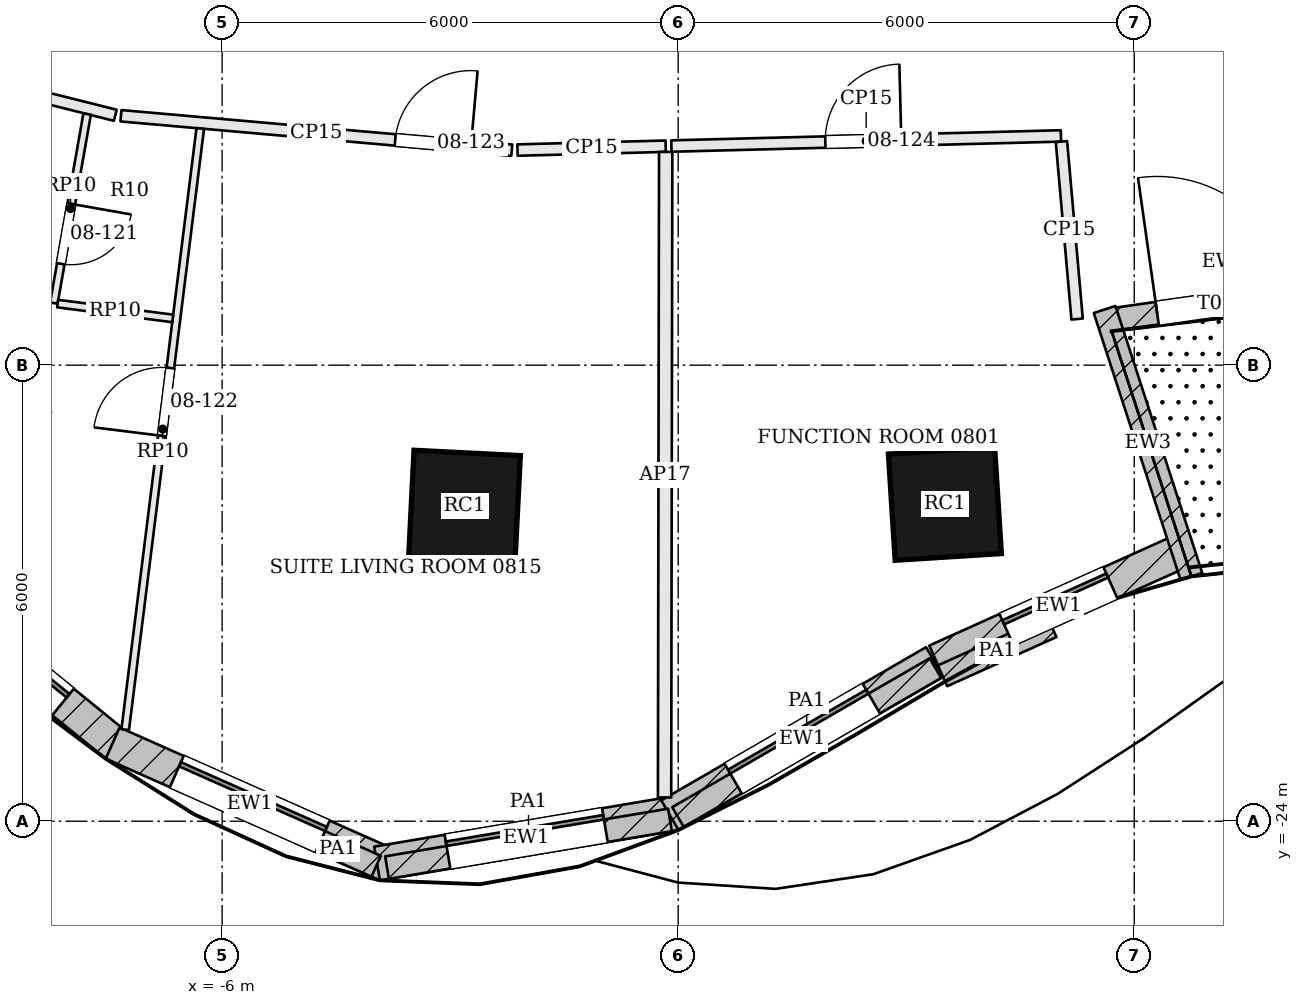
"""IFC4 building model, lengths in metres.
Left out: names, types, materials, properties, quantities, classifications, styles, units other than length and angle.
Written with IfcOpenShell. Run it as: python <this file> out.ifc"""

import sys

from ifc_helpers import new_model, si_unit, direction, frame, frame_2d, origin, origin_2d, place, context, subcontext, project, spatial, rectangle, extrude, element, fill, save


model = new_model("IFC4")
c1 = context("Model", 3, precision=1e-05, world=origin(), true_north=direction((0.0, 1.0)))
c2 = subcontext(c1, "Body", "Model", "MODEL_VIEW")
j1 = project(units=[si_unit("LENGTHUNIT", "METRE"), si_unit("PLANEANGLEUNIT", "RADIAN")], contexts=[c1])
p1 = place(None, origin())
s1 = spatial("IfcSite", under=j1, at=p1, CompositionType="ELEMENT")
p2 = place(p1, origin())
s2 = spatial("IfcBuilding", under=s1, at=p2, CompositionType="ELEMENT")
p3 = place(p2, frame((0.0, 0.0, 44.7)))
s3 = spatial("IfcBuildingStorey", under=s2, at=p3, CompositionType="ELEMENT", Elevation=44.7)
for number, where, z_axis, x_axis in (
    (1, (-2.811, -19.854, 0.0), (0.0, 0.0, 1.0), (0.999, -0.05, 0.0)),
    (2, (3.509, -19.824, 0.0), (0.0, 0.0, 1.0), (0.998, 0.063, 0.0)),
):
    element("IfcColumn", number, at=place(p3, frame(where, z_axis=z_axis, x_axis=x_axis)), inside=s3, PredefinedType="COLUMN", context=c2, shape_type="SweptSolid", body=[
        extrude(rectangle(XDim=1.4, YDim=1.4, at=origin_2d()), origin(), (0.0, 0.0, 1.0), 3.6),
    ])
p4 = place(p3, frame((-10.422, -20.539, 0.0), z_axis=(0.0, 0.0, 1.0), x_axis=(0.775999170522, -0.63073392754, 0.0)))
e3 = element("IfcWall", 3, at=p4, inside=s3, PredefinedType="SOLIDWALL", context=c2, shape_type="SweptSolid", body=[
    extrude(rectangle(XDim=3.903, YDim=0.45, at=frame_2d((1.951, 0.0))), origin(), (0.0, 0.0, 1.0), 3.4),
])
p5 = place(p4, frame((0.901, 0.0, 0.9)))
e4 = element("IfcOpeningElement", 4, at=p5, cuts=e3, PredefinedType="OPENING", context=c2, shape_type="SweptSolid", body=[
    extrude(rectangle(XDim=2.1, YDim=2.0, at=frame_2d((1.05, 1.0))), frame((0.0, 0.235, 0.0), z_axis=(0.0, -1.0, 0.0), x_axis=(1.0, 0.0, 0.0)), (0.0, 0.0, 1.0), 0.47),
])
p6 = place(p3, frame((-7.44, -22.972, 0.0), z_axis=(0.0, 0.0, 1.0), x_axis=(0.914114918534, -0.405455195692, 0.0)))
e5 = element("IfcWall", 5, at=p6, inside=s3, PredefinedType="SOLIDWALL", context=c2, shape_type="SweptSolid", body=[
    extrude(rectangle(XDim=3.946, YDim=0.45, at=frame_2d((1.973, 0.0))), origin(), (0.0, 0.0, 1.0), 3.4),
])
p7 = place(p6, frame((0.923, 0.0, 0.9)))
e6 = element("IfcOpeningElement", 6, at=p7, cuts=e5, PredefinedType="OPENING", context=c2, shape_type="SweptSolid", body=[
    extrude(rectangle(XDim=2.1, YDim=2.0, at=frame_2d((1.05, 1.0))), frame((0.0, 0.235, 0.0), z_axis=(0.0, -1.0, 0.0), x_axis=(1.0, 0.0, 0.0)), (0.0, 0.0, 1.0), 0.47),
])
p8 = place(p3, frame((-3.961, -24.556, 0.0), z_axis=(0.0, 0.0, 1.0), x_axis=(0.986102211406, 0.166139786505, 0.0)))
e7 = element("IfcWall", 7, at=p8, inside=s3, PredefinedType="SOLIDWALL", context=c2, shape_type="SweptSolid", body=[
    extrude(rectangle(XDim=3.979, YDim=0.45, at=frame_2d((1.99, 0.0))), origin(), (0.0, 0.0, 1.0), 3.4),
])
p9 = place(p8, frame((0.94, 0.0, 0.9)))
e8 = element("IfcOpeningElement", 8, at=p9, cuts=e7, PredefinedType="OPENING", context=c2, shape_type="SweptSolid", body=[
    extrude(rectangle(XDim=2.1, YDim=2.0, at=frame_2d((1.05, 1.0))), frame((0.0, 0.235, 0.0), z_axis=(0.0, -1.0, 0.0), x_axis=(1.0, 0.0, 0.0)), (0.0, 0.0, 1.0), 0.47),
])
p10 = place(p3, frame((-0.109, -23.92, 0.0), z_axis=(0.0, 0.0, 1.0), x_axis=(0.865557769603, 0.500809092848, 0.0)))
e9 = element("IfcWall", 9, at=p10, inside=s3, PredefinedType="SOLIDWALL", context=c2, shape_type="SweptSolid", body=[
    extrude(rectangle(XDim=4.025, YDim=0.45, at=frame_2d((2.012, 0.0))), origin(), (0.0, 0.0, 1.0), 3.4),
])
p11 = place(p10, frame((0.962, 0.0, 0.9)))
e10 = element("IfcOpeningElement", 10, at=p11, cuts=e9, PredefinedType="OPENING", context=c2, shape_type="SweptSolid", body=[
    extrude(rectangle(XDim=2.1, YDim=2.0, at=frame_2d((1.05, 1.0))), frame((0.0, 0.235, 0.0), z_axis=(0.0, -1.0, 0.0), x_axis=(1.0, 0.0, 0.0)), (0.0, 0.0, 1.0), 0.47),
])
p12 = place(p3, frame((3.395, -21.894, 0.0), z_axis=(0.0, 0.0, 1.0), x_axis=(0.912061376588, 0.410053710306, 0.0)))
e11 = element("IfcWall", 11, at=p12, inside=s3, PredefinedType="SOLIDWALL", context=c2, shape_type="SweptSolid", body=[
    extrude(rectangle(XDim=3.526, YDim=0.45, at=frame_2d((1.763, 0.0))), origin(), (0.0, 0.0, 1.0), 3.4),
])
p13 = place(p12, frame((1.013, 0.0, 0.9)))
e12 = element("IfcOpeningElement", 12, at=p13, cuts=e11, PredefinedType="OPENING", context=c2, shape_type="SweptSolid", body=[
    extrude(rectangle(XDim=1.5, YDim=2.0, at=frame_2d((0.75, 1.0))), frame((0.0, 0.235, 0.0), z_axis=(0.0, -1.0, 0.0), x_axis=(1.0, 0.0, 0.0)), (0.0, 0.0, 1.0), 0.47),
])
p14 = place(p3, frame((5.682, -17.405, 0.0), z_axis=(0.0, 0.0, 1.0), x_axis=(0.990121520331, 0.140211893137, 0.0)))
e13 = element("IfcWall", 13, at=p14, inside=s3, PredefinedType="SOLIDWALL", context=c2, shape_type="SweptSolid", body=[
    extrude(rectangle(XDim=3.052, YDim=0.3, at=frame_2d((1.526, 0.0))), origin(), (0.0, 0.0, 1.0), 2.7),
])
p15 = place(p14, frame((0.626, 0.0, 0.0)))
e14 = element("IfcOpeningElement", 14, at=p15, cuts=e13, PredefinedType="OPENING", context=c2, shape_type="SweptSolid", body=[
    extrude(rectangle(XDim=1.8, YDim=2.4, at=frame_2d((0.9, 1.2))), frame((0.0, 0.16, 0.0), z_axis=(0.0, -1.0, 0.0), x_axis=(1.0, 0.0, 0.0)), (0.0, 0.0, 1.0), 0.32),
])
p16 = place(p3, frame((6.752, -20.779, 0.0), z_axis=(0.0, 0.0, 1.0), x_axis=(-0.309237068707, 0.950984981657, 0.0)))
e15 = element("IfcWall", 15, at=p16, inside=s3, PredefinedType="SOLIDWALL", context=c2, shape_type="SweptSolid", body=[
    extrude(rectangle(XDim=3.692, YDim=0.3, at=frame_2d((1.846, 0.0))), origin(), (0.0, 0.0, 1.0), 2.954),
])
p17 = place(p3, frame((-4.979, -24.146, 3.6), z_axis=(0.0, 0.0, 1.0), x_axis=(0.91414047558, -0.405397571412, 0.0)))
e16 = element("IfcWall", 16, at=p17, inside=s3, PredefinedType="PARAPET", context=c2, shape_type="SweptSolid", body=[
    extrude(rectangle(XDim=1.101, YDim=0.3, at=frame_2d((0.55, 0.0))), origin(), (0.0, 0.0, 1.0), 1.1),
])
p18 = place(p3, frame((-3.83, -24.61, 3.6), z_axis=(0.0, 0.0, 1.0), x_axis=(0.986111051666, 0.166087307712, 0.0)))
e17 = element("IfcWall", 17, at=p18, inside=s3, PredefinedType="PARAPET", context=c2, shape_type="SweptSolid", body=[
    extrude(rectangle(XDim=3.775, YDim=0.3, at=frame_2d((1.887, 0.0))), origin(), (0.0, 0.0, 1.0), 1.1),
])
p19 = place(p3, frame((-0.002, -23.945, 3.6), z_axis=(0.0, 0.0, 1.0), x_axis=(0.865550152763, 0.500822256945, 0.0)))
e18 = element("IfcWall", 18, at=p19, inside=s3, PredefinedType="PARAPET", context=c2, shape_type="SweptSolid", body=[
    extrude(rectangle(XDim=3.913, YDim=0.3, at=frame_2d((1.956, 0.0))), origin(), (0.0, 0.0, 1.0), 1.1),
])
p20 = place(p3, frame((3.478, -22.087, 3.6), z_axis=(0.0, 0.0, 1.0), x_axis=(0.912008401221, 0.410171520345, 0.0)))
e19 = element("IfcWall", 19, at=p20, inside=s3, PredefinedType="PARAPET", context=c2, shape_type="SweptSolid", body=[
    extrude(rectangle(XDim=1.577, YDim=0.3, at=frame_2d((0.788, 0.0))), origin(), (0.0, 0.0, 1.0), 1.1),
])
p21 = place(p3, frame((-12.083, -13.54, 0.0), z_axis=(0.0, 0.0, 1.0), x_axis=(0.969981460173, -0.243178878443, 0.0)))
e20 = element("IfcWall", 20, at=p21, inside=s3, PredefinedType="PARTITIONING", context=c2, shape_type="SweptSolid", body=[
    extrude(rectangle(XDim=4.822, YDim=0.15, at=frame_2d((2.411, 0.0))), origin(), (0.0, 0.0, 1.0), 2.68),
])
p22 = place(p3, frame((-7.331, -14.719, 0.0), z_axis=(0.0, 0.0, 1.0), x_axis=(0.996139466017, -0.087784760882, 0.0)))
e21 = element("IfcWall", 21, at=p22, inside=s3, PredefinedType="PARTITIONING", context=c2, shape_type="SweptSolid", body=[
    extrude(rectangle(XDim=5.162, YDim=0.15, at=frame_2d((2.581, 0.0))), origin(), (0.0, 0.0, 1.0), 2.68),
])
p23 = place(p22, frame((3.622, 0.0, 0.0)))
e22 = element("IfcOpeningElement", 22, at=p23, cuts=e21, PredefinedType="OPENING", context=c2, shape_type="SweptSolid", body=[
    extrude(rectangle(XDim=1.0, YDim=2.1, at=frame_2d((0.5, 1.05))), frame((0.0, 0.085, 0.0), z_axis=(0.0, -1.0, 0.0), x_axis=(1.0, 0.0, 0.0)), (0.0, 0.0, 1.0), 0.17),
])
p24 = place(p3, frame((-2.114, -15.17, 0.0), z_axis=(0.0, 0.0, 1.0), x_axis=(0.999660986361, 0.026036749958, 0.0)))
e23 = element("IfcWall", 23, at=p24, inside=s3, PredefinedType="PARTITIONING", context=c2, shape_type="SweptSolid", body=[
    extrude(rectangle(XDim=1.95, YDim=0.15, at=frame_2d((0.975, 0.0))), origin(), (0.0, 0.0, 1.0), 2.68),
])
p25 = place(p3, frame((-0.179, -23.687, 0.0), z_axis=(0.0, 0.0, 1.0), x_axis=(0.001753677156, 0.999998462307, 0.0)))
e24 = element("IfcWall", 24, at=p25, inside=s3, PredefinedType="PARTITIONING", context=c2, shape_type="SweptSolid", body=[
    extrude(rectangle(XDim=8.492, YDim=0.175, at=frame_2d((4.246, 0.0))), origin(), (0.0, 0.0, 1.0), 2.68),
])
p26 = place(p3, frame((-0.089, -15.117, 0.0), z_axis=(0.0, 0.0, 1.0), x_axis=(0.999661881663, 0.026002352789, 0.0)))
e25 = element("IfcWall", 25, at=p26, inside=s3, PredefinedType="PARTITIONING", context=c2, shape_type="SweptSolid", body=[
    extrude(rectangle(XDim=5.126, YDim=0.15, at=frame_2d((2.563, 0.0))), origin(), (0.0, 0.0, 1.0), 2.68),
])
p27 = place(p26, frame((2.026, 0.0, 0.0)))
e26 = element("IfcOpeningElement", 26, at=p27, cuts=e25, PredefinedType="OPENING", context=c2, shape_type="SweptSolid", body=[
    extrude(rectangle(XDim=1.0, YDim=2.4, at=frame_2d((0.5, 1.2))), frame((0.0, 0.085, 0.0), z_axis=(0.0, -1.0, 0.0), x_axis=(1.0, 0.0, 0.0)), (0.0, 0.0, 1.0), 0.17),
])
p28 = place(p3, frame((5.249, -17.393, 0.0), z_axis=(0.0, 0.0, 1.0), x_axis=(-0.088027582278, 0.996118037563, 0.0)))
e27 = element("IfcWall", 27, at=p28, inside=s3, PredefinedType="PARTITIONING", context=c2, shape_type="SweptSolid", body=[
    extrude(rectangle(XDim=2.344, YDim=0.15, at=frame_2d((1.172, 0.0))), origin(), (0.0, 0.0, 1.0), 2.68),
])
p29 = place(p3, frame((-7.275, -22.795, 0.0), z_axis=(0.0, 0.0, 1.0), x_axis=(0.123872623133, 0.992298127197, 0.0)))
e28 = element("IfcWall", 28, at=p29, inside=s3, PredefinedType="PARTITIONING", context=c2, shape_type="SweptSolid", body=[
    extrude(rectangle(XDim=7.97, YDim=0.1, at=frame_2d((3.985, 0.0))), origin(), (0.0, 0.0, 1.0), 2.68),
])
p30 = place(p29, frame((3.895, 0.0, 0.0)))
e29 = element("IfcOpeningElement", 29, at=p30, cuts=e28, PredefinedType="OPENING", context=c2, shape_type="SweptSolid", body=[
    extrude(rectangle(XDim=0.9, YDim=2.4, at=frame_2d((0.45, 1.2))), frame((0.0, 0.06, 0.0), z_axis=(0.0, -1.0, 0.0), x_axis=(1.0, 0.0, 0.0)), (0.0, 0.0, 1.0), 0.12),
])
p31 = place(p3, frame((-7.776, -14.697, 0.0), z_axis=(0.0, 0.0, 1.0), x_axis=(-0.173360606745, -0.984858416235, 0.0)))
e30 = element("IfcWall", 30, at=p31, inside=s3, PredefinedType="PARTITIONING", context=c2, shape_type="SweptSolid", body=[
    extrude(rectangle(XDim=2.525, YDim=0.1, at=frame_2d((1.263, 0.0))), origin(), (0.0, 0.0, 1.0), 2.68),
])
p32 = place(p31, frame((1.2, 0.0, 0.0)))
e31 = element("IfcOpeningElement", 31, at=p32, cuts=e30, PredefinedType="OPENING", context=c2, shape_type="SweptSolid", body=[
    extrude(rectangle(XDim=0.8, YDim=2.1, at=frame_2d((0.4, 1.05))), frame((0.0, 0.06, 0.0), z_axis=(0.0, -1.0, 0.0), x_axis=(1.0, 0.0, 0.0)), (0.0, 0.0, 1.0), 0.12),
])
p33 = place(p3, frame((-8.164, -17.19, 0.0), z_axis=(0.0, 0.0, 1.0), x_axis=(0.991762801698, -0.128088036788, 0.0)))
e32 = element("IfcWall", 32, at=p33, inside=s3, PredefinedType="PARTITIONING", context=c2, shape_type="SweptSolid", body=[
    extrude(rectangle(XDim=1.527, YDim=0.1, at=frame_2d((0.763, 0.0))), origin(), (0.0, 0.0, 1.0), 2.68),
])
p34 = place(p5, origin())
e33 = element("IfcWindow", 33, at=p34, inside=s3, PartitioningType="SINGLE_PANEL", PredefinedType="WINDOW", context=c2, shape_type="SweptSolid", body=[
    extrude(rectangle(XDim=2.1, YDim=2.0, at=frame_2d((1.05, 1.0))), frame((0.0, 0.135, 0.0), z_axis=(0.0, -1.0, 0.0), x_axis=(1.0, 0.0, 0.0)), (0.0, 0.0, 1.0), 0.06),
])
fill(e4, e33)
p35 = place(p7, origin())
e34 = element("IfcWindow", 34, at=p35, inside=s3, PartitioningType="SINGLE_PANEL", PredefinedType="WINDOW", context=c2, shape_type="SweptSolid", body=[
    extrude(rectangle(XDim=2.1, YDim=2.0, at=frame_2d((1.05, 1.0))), frame((0.0, 0.135, 0.0), z_axis=(0.0, -1.0, 0.0), x_axis=(1.0, 0.0, 0.0)), (0.0, 0.0, 1.0), 0.06),
])
fill(e6, e34)
p36 = place(p9, origin())
e35 = element("IfcWindow", 35, at=p36, inside=s3, PartitioningType="SINGLE_PANEL", PredefinedType="WINDOW", context=c2, shape_type="SweptSolid", body=[
    extrude(rectangle(XDim=2.1, YDim=2.0, at=frame_2d((1.05, 1.0))), frame((0.0, 0.135, 0.0), z_axis=(0.0, -1.0, 0.0), x_axis=(1.0, 0.0, 0.0)), (0.0, 0.0, 1.0), 0.06),
])
fill(e8, e35)
p37 = place(p11, origin())
e36 = element("IfcWindow", 36, at=p37, inside=s3, PartitioningType="SINGLE_PANEL", PredefinedType="WINDOW", context=c2, shape_type="SweptSolid", body=[
    extrude(rectangle(XDim=2.1, YDim=2.0, at=frame_2d((1.05, 1.0))), frame((0.0, 0.135, 0.0), z_axis=(0.0, -1.0, 0.0), x_axis=(1.0, 0.0, 0.0)), (0.0, 0.0, 1.0), 0.06),
])
fill(e10, e36)
p38 = place(p13, origin())
e37 = element("IfcWindow", 37, at=p38, inside=s3, PartitioningType="SINGLE_PANEL", PredefinedType="WINDOW", context=c2, shape_type="SweptSolid", body=[
    extrude(rectangle(XDim=1.5, YDim=2.0, at=frame_2d((0.75, 1.0))), frame((0.0, 0.135, 0.0), z_axis=(0.0, -1.0, 0.0), x_axis=(1.0, 0.0, 0.0)), (0.0, 0.0, 1.0), 0.06),
])
fill(e12, e37)
p39 = place(p15, origin())
e38 = element("IfcDoor", 38, at=p39, inside=s3, OperationType="DOUBLE_DOOR_DOUBLE_SWING", PredefinedType="DOOR", context=c2, shape_type="SweptSolid", body=[
    extrude(rectangle(XDim=1.8, YDim=2.4, at=frame_2d((0.9, 1.2))), frame((0.0, 0.025, 0.0), z_axis=(0.0, -1.0, 0.0), x_axis=(1.0, 0.0, 0.0)), (0.0, 0.0, 1.0), 0.05),
])
fill(e14, e38)
p40 = place(p32, origin())
e39 = element("IfcDoor", 39, at=p40, inside=s3, OperationType="SINGLE_SWING_LEFT", PredefinedType="DOOR", context=c2, shape_type="SweptSolid", body=[
    extrude(rectangle(XDim=0.8, YDim=2.1, at=frame_2d((0.4, 1.05))), frame((0.0, 0.025, 0.0), z_axis=(0.0, -1.0, 0.0), x_axis=(1.0, 0.0, 0.0)), (0.0, 0.0, 1.0), 0.05),
])
fill(e31, e39)
p41 = place(p30, origin())
e40 = element("IfcDoor", 40, at=p41, inside=s3, OperationType="SINGLE_SWING_LEFT", PredefinedType="DOOR", context=c2, shape_type="SweptSolid", body=[
    extrude(rectangle(XDim=0.9, YDim=2.4, at=frame_2d((0.45, 1.2))), frame((0.0, 0.025, 0.0), z_axis=(0.0, -1.0, 0.0), x_axis=(1.0, 0.0, 0.0)), (0.0, 0.0, 1.0), 0.05),
])
fill(e29, e40)
p42 = place(p23, origin())
e41 = element("IfcDoor", 41, at=p42, inside=s3, OperationType="SINGLE_SWING_RIGHT", PredefinedType="DOOR", context=c2, shape_type="SweptSolid", body=[
    extrude(rectangle(XDim=1.0, YDim=2.1, at=frame_2d((0.5, 1.05))), frame((0.0, 0.025, 0.0), z_axis=(0.0, -1.0, 0.0), x_axis=(1.0, 0.0, 0.0)), (0.0, 0.0, 1.0), 0.05),
])
fill(e22, e41)
p43 = place(p27, origin())
e42 = element("IfcDoor", 42, at=p43, inside=s3, OperationType="SINGLE_SWING_RIGHT", PredefinedType="DOOR", context=c2, shape_type="SweptSolid", body=[
    extrude(rectangle(XDim=1.0, YDim=2.4, at=frame_2d((0.5, 1.2))), frame((0.0, 0.025, 0.0), z_axis=(0.0, -1.0, 0.0), x_axis=(1.0, 0.0, 0.0)), (0.0, 0.0, 1.0), 0.05),
])
fill(e26, e42)
save(model, sys.argv[1])
